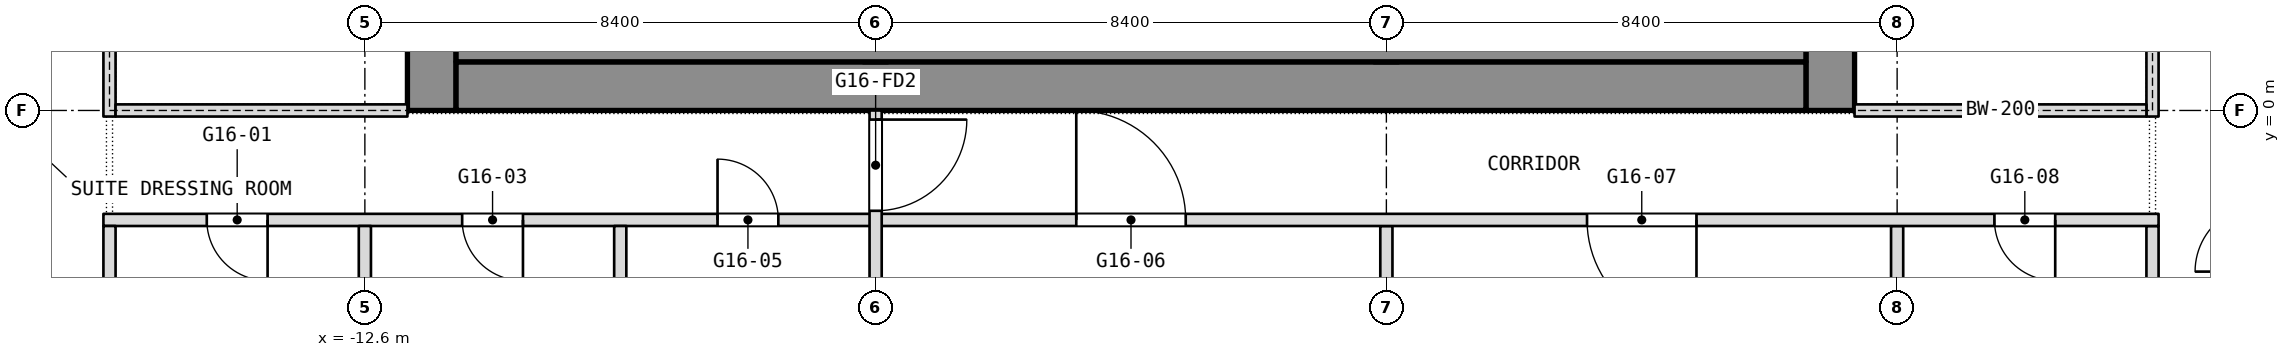
"""IFC4 building model, lengths in metres.
Left out: names, types, materials, properties, quantities, classifications, styles, units other than length and angle.
Written with IfcOpenShell. Run it as: python <this file> out.ifc"""

import sys

from ifc_helpers import new_model, si_unit, direction, frame, frame_2d, origin, place, context, subcontext, project, spatial, rectangle, extrude, element, fill, save


model = new_model("IFC4")
c1 = context("Model", 3, precision=1e-05, world=origin(), true_north=direction((0.0, 1.0)))
c2 = subcontext(c1, "Body", "Model", "MODEL_VIEW")
j1 = project(units=[si_unit("LENGTHUNIT", "METRE"), si_unit("PLANEANGLEUNIT", "RADIAN")], contexts=[c1])
p1 = place(None, origin())
s1 = spatial("IfcSite", under=j1, at=p1, CompositionType="ELEMENT")
p2 = place(p1, origin())
s2 = spatial("IfcBuilding", under=s1, at=p2, CompositionType="ELEMENT")
p3 = place(p2, frame((0.0, 0.0, 202.1)))
s3 = spatial("IfcBuildingStorey", under=s2, at=p3, CompositionType="ELEMENT", Elevation=202.1)
p4 = place(p3, frame((11.5, 0.0, 0.0), z_axis=(0.0, 0.0, 1.0), x_axis=(0.0, 1.0, 0.0)))
e1 = element("IfcWall", 1, at=p4, inside=s3, PredefinedType="SHEAR", context=c2, shape_type="SweptSolid", body=[
    extrude(rectangle(XDim=16.8, YDim=0.8, at=frame_2d((8.4, 0.0))), origin(), (0.0, 0.0, 1.0), 3.6),
])
p5 = place(p4, frame((2.3, 0.0, 0.0)))
e2 = element("IfcOpeningElement", 2, at=p5, cuts=e1, PredefinedType="OPENING", context=c2, shape_type="SweptSolid", body=[
    extrude(rectangle(XDim=1.1, YDim=2.1, at=frame_2d((0.55, 1.05))), frame((0.0, 0.4, 0.0), z_axis=(0.0, -1.0, 0.0), x_axis=(1.0, 0.0, 0.0)), (0.0, 0.0, 1.0), 0.8),
])
p6 = place(p4, frame((4.85, 0.0, 0.0)))
e3 = element("IfcOpeningElement", 3, at=p6, cuts=e1, PredefinedType="OPENING", context=c2, shape_type="SweptSolid", body=[
    extrude(rectangle(XDim=1.1, YDim=2.1, at=frame_2d((0.55, 1.05))), frame((0.0, 0.4, 0.0), z_axis=(0.0, -1.0, 0.0), x_axis=(1.0, 0.0, 0.0)), (0.0, 0.0, 1.0), 0.8),
])
p7 = place(p4, frame((6.825, 0.0, 0.0)))
e4 = element("IfcOpeningElement", 4, at=p7, cuts=e1, PredefinedType="OPENING", context=c2, shape_type="SweptSolid", body=[
    extrude(rectangle(XDim=1.2, YDim=2.1, at=frame_2d((0.6, 1.05))), frame((0.0, 0.4, 0.0), z_axis=(0.0, -1.0, 0.0), x_axis=(1.0, 0.0, 0.0)), (0.0, 0.0, 1.0), 0.8),
])
p8 = place(p4, frame((13.4, 0.0, 0.0)))
e5 = element("IfcOpeningElement", 5, at=p8, cuts=e1, PredefinedType="OPENING", context=c2, shape_type="SweptSolid", body=[
    extrude(rectangle(XDim=1.1, YDim=2.1, at=frame_2d((0.55, 1.05))), frame((0.0, 0.4, 0.0), z_axis=(0.0, -1.0, 0.0), x_axis=(1.0, 0.0, 0.0)), (0.0, 0.0, 1.0), 0.8),
])
p9 = place(p4, frame((10.85, 0.0, 0.0)))
e6 = element("IfcOpeningElement", 6, at=p9, cuts=e1, PredefinedType="OPENING", context=c2, shape_type="SweptSolid", body=[
    extrude(rectangle(XDim=1.1, YDim=2.1, at=frame_2d((0.55, 1.05))), frame((0.0, 0.4, 0.0), z_axis=(0.0, -1.0, 0.0), x_axis=(1.0, 0.0, 0.0)), (0.0, 0.0, 1.0), 0.8),
])
p10 = place(p4, frame((8.775, 0.0, 0.0)))
e7 = element("IfcOpeningElement", 7, at=p10, cuts=e1, PredefinedType="OPENING", context=c2, shape_type="SweptSolid", body=[
    extrude(rectangle(XDim=1.2, YDim=2.1, at=frame_2d((0.6, 1.05))), frame((0.0, 0.4, 0.0), z_axis=(0.0, -1.0, 0.0), x_axis=(1.0, 0.0, 0.0)), (0.0, 0.0, 1.0), 0.8),
])
p11 = place(p3, frame((-11.5, 0.0, 0.0), z_axis=(0.0, 0.0, 1.0), x_axis=(0.0, 1.0, 0.0)))
e8 = element("IfcWall", 8, at=p11, inside=s3, PredefinedType="SHEAR", context=c2, shape_type="SweptSolid", body=[
    extrude(rectangle(XDim=16.8, YDim=0.8, at=frame_2d((8.4, 0.0))), origin(), (0.0, 0.0, 1.0), 3.6),
])
p12 = place(p11, frame((3.6, 0.0, 0.0)))
e9 = element("IfcOpeningElement", 9, at=p12, cuts=e8, PredefinedType="OPENING", context=c2, shape_type="SweptSolid", body=[
    extrude(rectangle(XDim=0.9, YDim=2.1, at=frame_2d((0.45, 1.05))), frame((0.0, 0.4, 0.0), z_axis=(0.0, -1.0, 0.0), x_axis=(1.0, 0.0, 0.0)), (0.0, 0.0, 1.0), 0.8),
])
p13 = place(p11, frame((6.825, 0.0, 0.0)))
e10 = element("IfcOpeningElement", 10, at=p13, cuts=e8, PredefinedType="OPENING", context=c2, shape_type="SweptSolid", body=[
    extrude(rectangle(XDim=1.2, YDim=2.1, at=frame_2d((0.6, 1.05))), frame((0.0, 0.4, 0.0), z_axis=(0.0, -1.0, 0.0), x_axis=(1.0, 0.0, 0.0)), (0.0, 0.0, 1.0), 0.8),
])
p14 = place(p11, frame((14.062, 0.0, 0.0)))
e11 = element("IfcOpeningElement", 11, at=p14, cuts=e8, PredefinedType="OPENING", context=c2, shape_type="SweptSolid", body=[
    extrude(rectangle(XDim=0.9, YDim=2.1, at=frame_2d((0.45, 1.05))), frame((0.0, 0.4, 0.0), z_axis=(0.0, -1.0, 0.0), x_axis=(1.0, 0.0, 0.0)), (0.0, 0.0, 1.0), 0.8),
])
p15 = place(p11, frame((11.438, 0.0, 0.0)))
e12 = element("IfcOpeningElement", 12, at=p15, cuts=e8, PredefinedType="OPENING", context=c2, shape_type="SweptSolid", body=[
    extrude(rectangle(XDim=0.9, YDim=2.1, at=frame_2d((0.45, 1.05))), frame((0.0, 0.4, 0.0), z_axis=(0.0, -1.0, 0.0), x_axis=(1.0, 0.0, 0.0)), (0.0, 0.0, 1.0), 0.8),
])
p16 = place(p11, frame((8.775, 0.0, 0.0)))
e13 = element("IfcOpeningElement", 13, at=p16, cuts=e8, PredefinedType="OPENING", context=c2, shape_type="SweptSolid", body=[
    extrude(rectangle(XDim=1.2, YDim=2.1, at=frame_2d((0.6, 1.05))), frame((0.0, 0.4, 0.0), z_axis=(0.0, -1.0, 0.0), x_axis=(1.0, 0.0, 0.0)), (0.0, 0.0, 1.0), 0.8),
])
p17 = place(p3, frame((-11.1, 0.4, 0.0), z_axis=(0.0, 0.0, 1.0), x_axis=(1.0, 0.0, 0.0)))
e14 = element("IfcWall", 14, at=p17, inside=s3, PredefinedType="SHEAR", context=c2, shape_type="SweptSolid", body=[
    extrude(rectangle(XDim=22.2, YDim=0.8, at=frame_2d((11.1, 0.0))), origin(), (0.0, 0.0, 1.0), 3.6),
])
p18 = place(p3, frame((-4.2, 0.8, 0.0), z_axis=(0.0, 0.0, 1.0), x_axis=(0.0, 1.0, 0.0)))
e15 = element("IfcWall", 15, at=p18, inside=s3, PredefinedType="SHEAR", context=c2, shape_type="SweptSolid", body=[
    extrude(rectangle(XDim=15.2, YDim=0.4, at=frame_2d((7.6, 0.0))), origin(), (0.0, 0.0, 1.0), 3.6),
])
p19 = place(p18, frame((8.5, 0.0, 0.0)))
e16 = element("IfcOpeningElement", 16, at=p19, cuts=e15, PredefinedType="OPENING", context=c2, shape_type="SweptSolid", body=[
    extrude(rectangle(XDim=1.2, YDim=2.1, at=frame_2d((0.6, 1.05))), frame((0.0, 0.2, 0.0), z_axis=(0.0, -1.0, 0.0), x_axis=(1.0, 0.0, 0.0)), (0.0, 0.0, 1.0), 0.4),
])
p20 = place(p3, frame((4.2, 0.8, 0.0), z_axis=(0.0, 0.0, 1.0), x_axis=(0.0, 1.0, 0.0)))
e17 = element("IfcWall", 17, at=p20, inside=s3, PredefinedType="SHEAR", context=c2, shape_type="SweptSolid", body=[
    extrude(rectangle(XDim=15.2, YDim=0.4, at=frame_2d((7.6, 0.0))), origin(), (0.0, 0.0, 1.0), 3.6),
])
p21 = place(p20, frame((5.95, 0.0, 0.0)))
e18 = element("IfcOpeningElement", 18, at=p21, cuts=e17, PredefinedType="OPENING", context=c2, shape_type="SweptSolid", body=[
    extrude(rectangle(XDim=1.2, YDim=2.1, at=frame_2d((0.6, 1.05))), frame((0.0, 0.2, 0.0), z_axis=(0.0, -1.0, 0.0), x_axis=(1.0, 0.0, 0.0)), (0.0, 0.0, 1.0), 0.4),
])
for number, where, z_axis, x_axis in (
    (19, (16.8, -7.8, 0.0), (0.0, 0.0, 1.0), (0.0, 1.0, 0.0)),
    (20, (12.6, -7.8, 0.0), (0.0, 0.0, 1.0), (0.0, 1.0, 0.0)),
):
    element("IfcWall", number, at=place(p3, frame(where, z_axis=z_axis, x_axis=x_axis)), inside=s3, PredefinedType="PARTITIONING", context=c2, shape_type="SweptSolid", body=[
        extrude(rectangle(XDim=5.9, YDim=0.2, at=frame_2d((2.95, 0.0))), origin(), (0.0, 0.0, 1.0), 3.34),
    ])
p22 = place(p3, frame((4.2, -11.6, 0.0), z_axis=(0.0, 0.0, 1.0), x_axis=(0.0, 1.0, 0.0)))
e21 = element("IfcWall", 21, at=p22, inside=s3, PredefinedType="PARTITIONING", context=c2, shape_type="SweptSolid", body=[
    extrude(rectangle(XDim=9.7, YDim=0.2, at=frame_2d((4.85, 0.0))), origin(), (0.0, 0.0, 1.0), 3.34),
])
p23 = place(p3, frame((-16.9, -1.8, 0.0), z_axis=(0.0, 0.0, 1.0), x_axis=(1.0, 0.0, 0.0)))
e22 = element("IfcWall", 22, at=p23, inside=s3, PredefinedType="PARTITIONING", context=c2, shape_type="SweptSolid", body=[
    extrude(rectangle(XDim=33.8, YDim=0.2, at=frame_2d((16.9, 0.0))), origin(), (0.0, 0.0, 1.0), 3.34),
])
p24 = place(p23, frame((1.7, 0.0, 0.0)))
e23 = element("IfcOpeningElement", 23, at=p24, cuts=e22, PredefinedType="OPENING", context=c2, shape_type="SweptSolid", body=[
    extrude(rectangle(XDim=1.0, YDim=2.1, at=frame_2d((0.5, 1.05))), frame((0.0, 0.1, 0.0), z_axis=(0.0, -1.0, 0.0), x_axis=(1.0, 0.0, 0.0)), (0.0, 0.0, 1.0), 0.2),
])
p25 = place(p23, frame((5.9, 0.0, 0.0)))
e24 = element("IfcOpeningElement", 24, at=p25, cuts=e22, PredefinedType="OPENING", context=c2, shape_type="SweptSolid", body=[
    extrude(rectangle(XDim=1.0, YDim=2.1, at=frame_2d((0.5, 1.05))), frame((0.0, 0.1, 0.0), z_axis=(0.0, -1.0, 0.0), x_axis=(1.0, 0.0, 0.0)), (0.0, 0.0, 1.0), 0.2),
])
p26 = place(p23, frame((10.1, 0.0, 0.0)))
e25 = element("IfcOpeningElement", 25, at=p26, cuts=e22, PredefinedType="OPENING", context=c2, shape_type="SweptSolid", body=[
    extrude(rectangle(XDim=1.0, YDim=2.1, at=frame_2d((0.5, 1.05))), frame((0.0, 0.1, 0.0), z_axis=(0.0, -1.0, 0.0), x_axis=(1.0, 0.0, 0.0)), (0.0, 0.0, 1.0), 0.2),
])
p27 = place(p23, frame((16.0, 0.0, 0.0)))
e26 = element("IfcOpeningElement", 26, at=p27, cuts=e22, PredefinedType="OPENING", context=c2, shape_type="SweptSolid", body=[
    extrude(rectangle(XDim=1.8, YDim=2.1, at=frame_2d((0.9, 1.05))), frame((0.0, 0.1, 0.0), z_axis=(0.0, -1.0, 0.0), x_axis=(1.0, 0.0, 0.0)), (0.0, 0.0, 1.0), 0.2),
])
p28 = place(p23, frame((24.4, 0.0, 0.0)))
e27 = element("IfcOpeningElement", 27, at=p28, cuts=e22, PredefinedType="OPENING", context=c2, shape_type="SweptSolid", body=[
    extrude(rectangle(XDim=1.8, YDim=2.1, at=frame_2d((0.9, 1.05))), frame((0.0, 0.1, 0.0), z_axis=(0.0, -1.0, 0.0), x_axis=(1.0, 0.0, 0.0)), (0.0, 0.0, 1.0), 0.2),
])
p29 = place(p23, frame((31.1, 0.0, 0.0)))
e28 = element("IfcOpeningElement", 28, at=p29, cuts=e22, PredefinedType="OPENING", context=c2, shape_type="SweptSolid", body=[
    extrude(rectangle(XDim=1.0, YDim=2.1, at=frame_2d((0.5, 1.05))), frame((0.0, 0.1, 0.0), z_axis=(0.0, -1.0, 0.0), x_axis=(1.0, 0.0, 0.0)), (0.0, 0.0, 1.0), 0.2),
])
p30 = place(p3, frame((-4.2, -13.6, 0.0), z_axis=(0.0, 0.0, 1.0), x_axis=(0.0, 1.0, 0.0)))
e29 = element("IfcWall", 29, at=p30, inside=s3, PredefinedType="PARTITIONING", context=c2, shape_type="SweptSolid", body=[
    extrude(rectangle(XDim=13.6, YDim=0.2, at=frame_2d((6.8, 0.0))), origin(), (0.0, 0.0, 1.0), 3.34),
])
p31 = place(p30, frame((11.95, 0.0, 0.0)))
e30 = element("IfcOpeningElement", 30, at=p31, cuts=e29, PredefinedType="OPENING", context=c2, shape_type="SweptSolid", body=[
    extrude(rectangle(XDim=1.5, YDim=2.1, at=frame_2d((0.75, 1.05))), frame((0.0, 0.1, 0.0), z_axis=(0.0, -1.0, 0.0), x_axis=(1.0, 0.0, 0.0)), (0.0, 0.0, 1.0), 0.2),
])
p32 = place(p30, frame((0.25, 0.0, 0.0)))
e31 = element("IfcOpeningElement", 31, at=p32, cuts=e29, PredefinedType="OPENING", context=c2, shape_type="SweptSolid", body=[
    extrude(rectangle(XDim=1.5, YDim=2.1, at=frame_2d((0.75, 1.05))), frame((0.0, 0.1, 0.0), z_axis=(0.0, -1.0, 0.0), x_axis=(1.0, 0.0, 0.0)), (0.0, 0.0, 1.0), 0.2),
])
p33 = place(p3, frame((-8.4, -8.0, 0.0), z_axis=(0.0, 0.0, 1.0), x_axis=(0.0, 1.0, 0.0)))
e32 = element("IfcWall", 32, at=p33, inside=s3, PredefinedType="PARTITIONING", context=c2, shape_type="SweptSolid", body=[
    extrude(rectangle(XDim=6.1, YDim=0.2, at=frame_2d((3.05, 0.0))), origin(), (0.0, 0.0, 1.0), 3.34),
])
p34 = place(p3, frame((-12.6, -7.8, 0.0), z_axis=(0.0, 0.0, 1.0), x_axis=(0.0, 1.0, 0.0)))
e33 = element("IfcWall", 33, at=p34, inside=s3, PredefinedType="PARTITIONING", context=c2, shape_type="SweptSolid", body=[
    extrude(rectangle(XDim=5.9, YDim=0.2, at=frame_2d((2.95, 0.0))), origin(), (0.0, 0.0, 1.0), 3.34),
])
p35 = place(p3, frame((-16.8, -8.0, 0.0), z_axis=(0.0, 0.0, 1.0), x_axis=(0.0, 1.0, 0.0)))
e34 = element("IfcWall", 34, at=p35, inside=s3, PredefinedType="PARTITIONING", context=c2, shape_type="SweptSolid", body=[
    extrude(rectangle(XDim=6.1, YDim=0.2, at=frame_2d((3.05, 0.0))), origin(), (0.0, 0.0, 1.0), 3.34),
])
p36 = place(p3, frame((-11.1, 1.15, 0.0), z_axis=(0.0, 0.0, 1.0), x_axis=(1.0, 0.0, 0.0)))
e35 = element("IfcWall", 35, at=p36, inside=s3, PredefinedType="PARTITIONING", context=c2, shape_type="SweptSolid", body=[
    extrude(rectangle(XDim=22.2, YDim=0.7, at=frame_2d((11.1, 0.0))), origin(), (0.0, 0.0, 1.0), 3.34),
])
p37 = place(p3, frame((-16.8, -0.1, 0.0), z_axis=(0.0, 0.0, 1.0), x_axis=(0.0, 1.0, 0.0)))
e36 = element("IfcWall", 36, at=p37, inside=s3, PredefinedType="PARTITIONING", context=c2, shape_type="SweptSolid", body=[
    extrude(rectangle(XDim=17.0, YDim=0.2, at=frame_2d((8.5, 0.0))), origin(), (0.0, 0.0, 1.0), 3.34),
])
p38 = place(p37, frame((2.2, 0.0, 0.0)))
e37 = element("IfcOpeningElement", 37, at=p38, cuts=e36, PredefinedType="OPENING", context=c2, shape_type="SweptSolid", body=[
    extrude(rectangle(XDim=1.8, YDim=2.1, at=frame_2d((0.9, 1.05))), frame((0.0, 0.1, 0.0), z_axis=(0.0, -1.0, 0.0), x_axis=(1.0, 0.0, 0.0)), (0.0, 0.0, 1.0), 0.2),
])
p39 = place(p37, frame((13.0, 0.0, 0.0)))
e38 = element("IfcOpeningElement", 38, at=p39, cuts=e36, PredefinedType="OPENING", context=c2, shape_type="SweptSolid", body=[
    extrude(rectangle(XDim=1.8, YDim=2.1, at=frame_2d((0.9, 1.05))), frame((0.0, 0.1, 0.0), z_axis=(0.0, -1.0, 0.0), x_axis=(1.0, 0.0, 0.0)), (0.0, 0.0, 1.0), 0.2),
])
p40 = place(p3, frame((-16.7, 0.0, 0.0), z_axis=(0.0, 0.0, 1.0), x_axis=(1.0, 0.0, 0.0)))
e39 = element("IfcWall", 39, at=p40, inside=s3, PredefinedType="PARTITIONING", context=c2, shape_type="SweptSolid", body=[
    extrude(rectangle(XDim=4.8, YDim=0.2, at=frame_2d((2.4, 0.0))), origin(), (0.0, 0.0, 1.0), 2.94),
])
p41 = place(p3, frame((16.8, -0.1, 0.0), z_axis=(0.0, 0.0, 1.0), x_axis=(0.0, 1.0, 0.0)))
e40 = element("IfcWall", 40, at=p41, inside=s3, PredefinedType="PARTITIONING", context=c2, shape_type="SweptSolid", body=[
    extrude(rectangle(XDim=17.0, YDim=0.2, at=frame_2d((8.5, 0.0))), origin(), (0.0, 0.0, 1.0), 3.34),
])
p42 = place(p41, frame((2.2, 0.0, 0.0)))
e41 = element("IfcOpeningElement", 41, at=p42, cuts=e40, PredefinedType="OPENING", context=c2, shape_type="SweptSolid", body=[
    extrude(rectangle(XDim=1.8, YDim=2.1, at=frame_2d((0.9, 1.05))), frame((0.0, 0.1, 0.0), z_axis=(0.0, -1.0, 0.0), x_axis=(1.0, 0.0, 0.0)), (0.0, 0.0, 1.0), 0.2),
])
p43 = place(p41, frame((13.0, 0.0, 0.0)))
e42 = element("IfcOpeningElement", 42, at=p43, cuts=e40, PredefinedType="OPENING", context=c2, shape_type="SweptSolid", body=[
    extrude(rectangle(XDim=1.8, YDim=2.1, at=frame_2d((0.9, 1.05))), frame((0.0, 0.1, 0.0), z_axis=(0.0, -1.0, 0.0), x_axis=(1.0, 0.0, 0.0)), (0.0, 0.0, 1.0), 0.2),
])
p44 = place(p3, frame((11.9, 0.0, 0.0), z_axis=(0.0, 0.0, 1.0), x_axis=(1.0, 0.0, 0.0)))
e43 = element("IfcWall", 43, at=p44, inside=s3, PredefinedType="PARTITIONING", context=c2, shape_type="SweptSolid", body=[
    extrude(rectangle(XDim=4.8, YDim=0.2, at=frame_2d((2.4, 0.0))), origin(), (0.0, 0.0, 1.0), 2.94),
])
p45 = place(p24, origin())
e44 = element("IfcDoor", 44, at=p45, inside=s3, OperationType="SINGLE_SWING_LEFT", PredefinedType="DOOR", context=c2, shape_type="SweptSolid", body=[
    extrude(rectangle(XDim=1.0, YDim=2.1, at=frame_2d((0.5, 1.05))), frame((0.0, 0.025, 0.0), z_axis=(0.0, -1.0, 0.0), x_axis=(1.0, 0.0, 0.0)), (0.0, 0.0, 1.0), 0.05),
])
fill(e23, e44)
p46 = place(p25, origin())
e45 = element("IfcDoor", 45, at=p46, inside=s3, OperationType="SINGLE_SWING_LEFT", PredefinedType="DOOR", context=c2, shape_type="SweptSolid", body=[
    extrude(rectangle(XDim=1.0, YDim=2.1, at=frame_2d((0.5, 1.05))), frame((0.0, 0.025, 0.0), z_axis=(0.0, -1.0, 0.0), x_axis=(1.0, 0.0, 0.0)), (0.0, 0.0, 1.0), 0.05),
])
fill(e24, e45)
p47 = place(p26, origin())
e46 = element("IfcDoor", 46, at=p47, inside=s3, OperationType="SINGLE_SWING_RIGHT", PredefinedType="DOOR", context=c2, shape_type="SweptSolid", body=[
    extrude(rectangle(XDim=1.0, YDim=2.1, at=frame_2d((0.5, 1.05))), frame((0.0, 0.025, 0.0), z_axis=(0.0, -1.0, 0.0), x_axis=(1.0, 0.0, 0.0)), (0.0, 0.0, 1.0), 0.05),
])
fill(e25, e46)
p48 = place(p27, origin())
e47 = element("IfcDoor", 47, at=p48, inside=s3, OperationType="DOUBLE_DOOR_SINGLE_SWING", PredefinedType="DOOR", context=c2, shape_type="SweptSolid", body=[
    extrude(rectangle(XDim=1.8, YDim=2.1, at=frame_2d((0.9, 1.05))), frame((0.0, 0.025, 0.0), z_axis=(0.0, -1.0, 0.0), x_axis=(1.0, 0.0, 0.0)), (0.0, 0.0, 1.0), 0.05),
])
fill(e26, e47)
p49 = place(p28, origin())
e48 = element("IfcDoor", 48, at=p49, inside=s3, OperationType="DOUBLE_DOOR_SINGLE_SWING", PredefinedType="DOOR", context=c2, shape_type="SweptSolid", body=[
    extrude(rectangle(XDim=1.8, YDim=2.1, at=frame_2d((0.9, 1.05))), frame((0.0, 0.025, 0.0), z_axis=(0.0, -1.0, 0.0), x_axis=(1.0, 0.0, 0.0)), (0.0, 0.0, 1.0), 0.05),
])
fill(e27, e48)
p50 = place(p29, origin())
e49 = element("IfcDoor", 49, at=p50, inside=s3, OperationType="SINGLE_SWING_LEFT", PredefinedType="DOOR", context=c2, shape_type="SweptSolid", body=[
    extrude(rectangle(XDim=1.0, YDim=2.1, at=frame_2d((0.5, 1.05))), frame((0.0, 0.025, 0.0), z_axis=(0.0, -1.0, 0.0), x_axis=(1.0, 0.0, 0.0)), (0.0, 0.0, 1.0), 0.05),
])
fill(e28, e49)
p51 = place(p31, origin())
e50 = element("IfcDoor", 50, at=p51, inside=s3, OperationType="DOUBLE_DOOR_DOUBLE_SWING", PredefinedType="DOOR", context=c2, shape_type="SweptSolid", body=[
    extrude(rectangle(XDim=1.5, YDim=2.1, at=frame_2d((0.75, 1.05))), frame((0.0, 0.025, 0.0), z_axis=(0.0, -1.0, 0.0), x_axis=(1.0, 0.0, 0.0)), (0.0, 0.0, 1.0), 0.05),
])
fill(e30, e50)
save(model, sys.argv[1])
